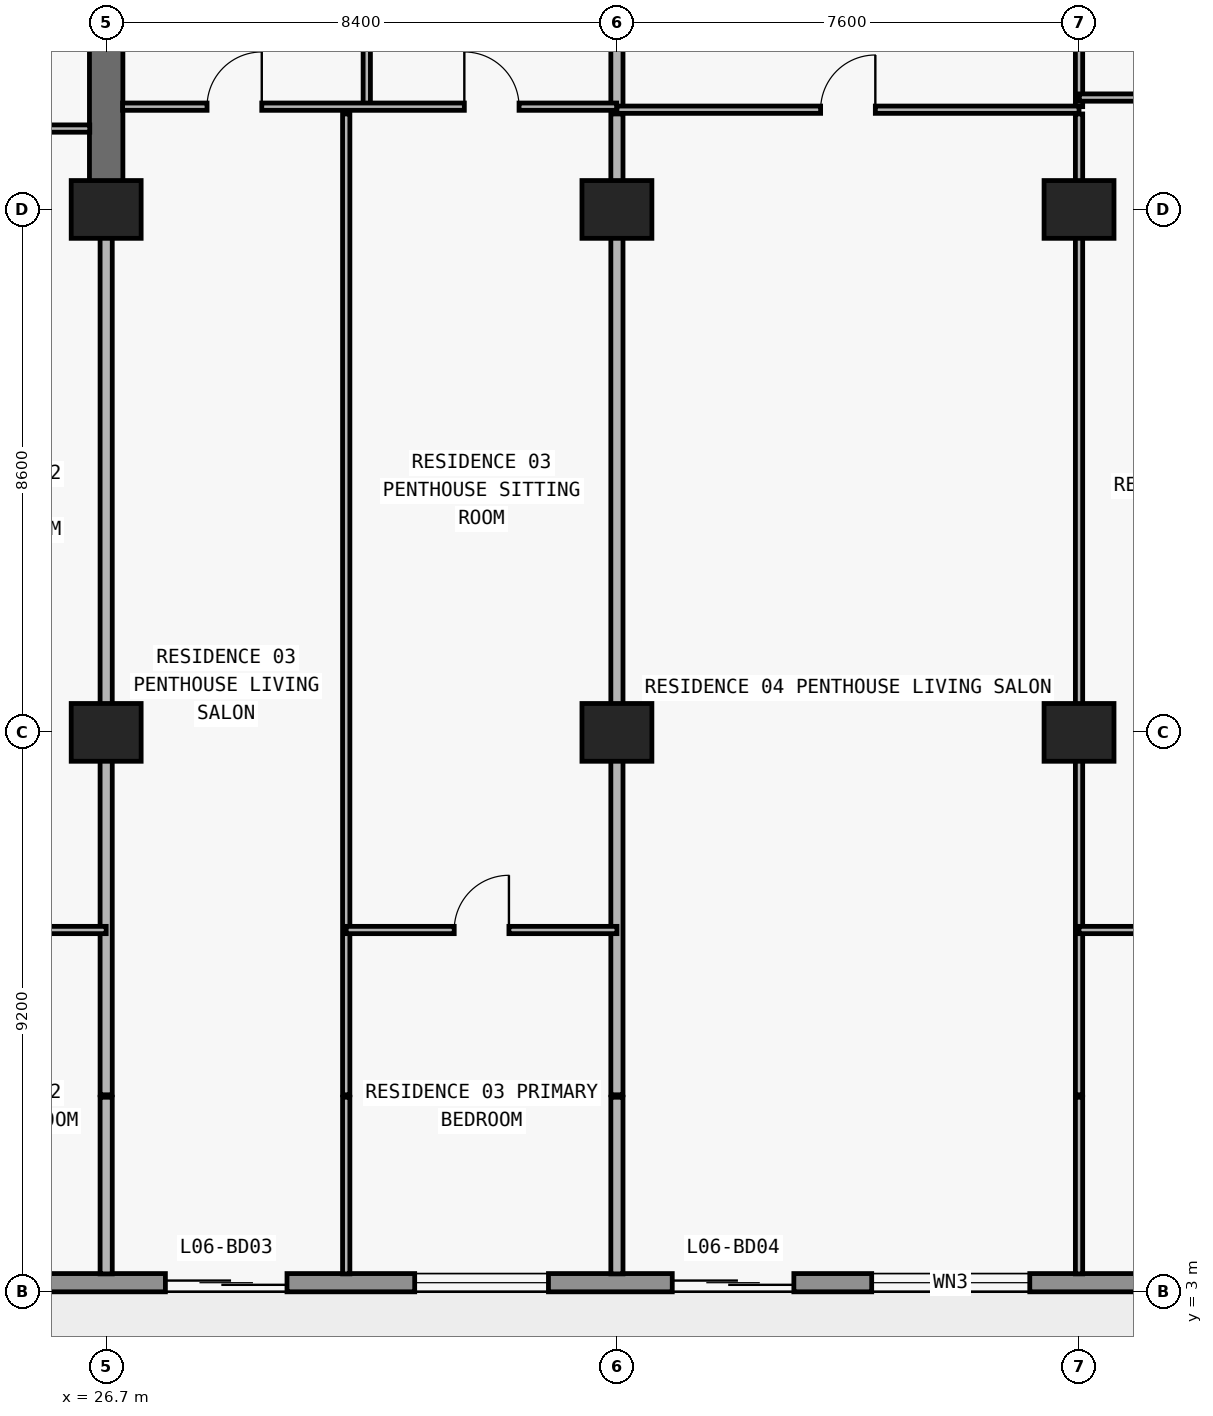
"""IFC4 building model, lengths in metres.
Left out: names, types, materials, properties, quantities, classifications, styles, units other than length and angle.
Written with IfcOpenShell. Run it as: python <this file> out.ifc"""

import sys

from ifc_helpers import new_model, si_unit, direction, frame, frame_2d, origin, origin_2d, place, context, subcontext, project, spatial, rectangle, extrude, element, fill, save


model = new_model("IFC4")
c1 = context("Model", 3, precision=1e-05, world=origin(), true_north=direction((0.0, 1.0)))
c2 = subcontext(c1, "Body", "Model", "MODEL_VIEW")
j1 = project(units=[si_unit("LENGTHUNIT", "METRE"), si_unit("PLANEANGLEUNIT", "RADIAN")], contexts=[c1])
p1 = place(None, origin())
s1 = spatial("IfcSite", under=j1, at=p1, CompositionType="ELEMENT")
p2 = place(p1, origin())
s2 = spatial("IfcBuilding", under=s1, at=p2, CompositionType="ELEMENT")
p3 = place(p2, frame((0.0, 0.0, 30.0)))
s3 = spatial("IfcBuildingStorey", under=s2, at=p3, CompositionType="ELEMENT", Elevation=30.0)
for number, where, z_axis, x_axis in (
    (1, (26.7, 12.2, 0.0), (0.0, 0.0, 1.0), (1.0, 0.0, 0.0)),
    (2, (35.1, 12.2, 0.0), (0.0, 0.0, 1.0), (1.0, 0.0, 0.0)),
    (3, (42.7, 12.2, 0.0), (0.0, 0.0, 1.0), (1.0, 0.0, 0.0)),
    (4, (26.7, 20.8, 0.0), (0.0, 0.0, 1.0), (1.0, 0.0, 0.0)),
    (5, (35.1, 20.8, 0.0), (0.0, 0.0, 1.0), (1.0, 0.0, 0.0)),
    (6, (42.7, 20.8, 0.0), (0.0, 0.0, 1.0), (1.0, 0.0, 0.0)),
):
    element("IfcColumn", number, at=place(p3, frame(where, z_axis=z_axis, x_axis=x_axis)), inside=s3, PredefinedType="COLUMN", context=c2, shape_type="SweptSolid", body=[
        extrude(rectangle(XDim=1.15, YDim=0.95, at=origin_2d()), origin(), (0.0, 0.0, 1.0), 3.05),
    ])
p4 = place(p3, frame((26.7, 20.8, 0.0), z_axis=(0.0, 0.0, 1.0), x_axis=(0.0, 1.0, 0.0)))
e7 = element("IfcWall", 7, at=p4, inside=s3, PredefinedType="SHEAR", context=c2, shape_type="SweptSolid", body=[
    extrude(rectangle(XDim=8.6, YDim=0.55, at=frame_2d((4.3, 0.0))), origin(), (0.0, 0.0, 1.0), 3.05),
])
p5 = place(p3, frame((72.7, 3.15, 0.0), z_axis=(0.0, 0.0, 1.0), x_axis=(-1.0, 0.0, 0.0)))
e8 = element("IfcWall", 8, at=p5, inside=s3, PredefinedType="STANDARD", context=c2, shape_type="SweptSolid", body=[
    extrude(rectangle(XDim=67.6, YDim=0.3, at=frame_2d((33.8, 0.0))), origin(), (0.0, 0.0, 1.0), 3.05),
])
p6 = place(p5, frame((59.826, 0.0, 0.0)))
e9 = element("IfcOpeningElement", 9, at=p6, cuts=e8, PredefinedType="OPENING", context=c2, shape_type="SweptSolid", body=[
    extrude(rectangle(XDim=2.0, YDim=2.3, at=frame_2d((1.0, 1.15))), frame((0.0, 0.16, 0.0), z_axis=(0.0, -1.0, 0.0), x_axis=(1.0, 0.0, 0.0)), (0.0, 0.0, 1.0), 0.32),
])
p7 = place(p5, frame((55.526, 0.0, 0.85)))
e10 = element("IfcOpeningElement", 10, at=p7, cuts=e8, PredefinedType="OPENING", context=c2, shape_type="SweptSolid", body=[
    extrude(rectangle(XDim=2.2, YDim=1.55, at=frame_2d((1.1, 0.775))), frame((0.0, 0.16, 0.0), z_axis=(0.0, -1.0, 0.0), x_axis=(1.0, 0.0, 0.0)), (0.0, 0.0, 1.0), 0.32),
])
p8 = place(p5, frame((51.09, 0.0, 0.0)))
e11 = element("IfcOpeningElement", 11, at=p8, cuts=e8, PredefinedType="OPENING", context=c2, shape_type="SweptSolid", body=[
    extrude(rectangle(XDim=2.0, YDim=2.3, at=frame_2d((1.0, 1.15))), frame((0.0, 0.16, 0.0), z_axis=(0.0, -1.0, 0.0), x_axis=(1.0, 0.0, 0.0)), (0.0, 0.0, 1.0), 0.32),
])
p9 = place(p5, frame((46.99, 0.0, 0.85)))
e12 = element("IfcOpeningElement", 12, at=p9, cuts=e8, PredefinedType="OPENING", context=c2, shape_type="SweptSolid", body=[
    extrude(rectangle(XDim=1.8, YDim=1.55, at=frame_2d((0.9, 0.775))), frame((0.0, 0.16, 0.0), z_axis=(0.0, -1.0, 0.0), x_axis=(1.0, 0.0, 0.0)), (0.0, 0.0, 1.0), 0.32),
])
p10 = place(p5, frame((43.026, 0.0, 0.0)))
e13 = element("IfcOpeningElement", 13, at=p10, cuts=e8, PredefinedType="OPENING", context=c2, shape_type="SweptSolid", body=[
    extrude(rectangle(XDim=2.0, YDim=2.3, at=frame_2d((1.0, 1.15))), frame((0.0, 0.16, 0.0), z_axis=(0.0, -1.0, 0.0), x_axis=(1.0, 0.0, 0.0)), (0.0, 0.0, 1.0), 0.32),
])
p11 = place(p5, frame((38.726, 0.0, 0.85)))
e14 = element("IfcOpeningElement", 14, at=p11, cuts=e8, PredefinedType="OPENING", context=c2, shape_type="SweptSolid", body=[
    extrude(rectangle(XDim=2.2, YDim=1.55, at=frame_2d((1.1, 0.775))), frame((0.0, 0.16, 0.0), z_axis=(0.0, -1.0, 0.0), x_axis=(1.0, 0.0, 0.0)), (0.0, 0.0, 1.0), 0.32),
])
p12 = place(p5, frame((34.69, 0.0, 0.0)))
e15 = element("IfcOpeningElement", 15, at=p12, cuts=e8, PredefinedType="OPENING", context=c2, shape_type="SweptSolid", body=[
    extrude(rectangle(XDim=2.0, YDim=2.3, at=frame_2d((1.0, 1.15))), frame((0.0, 0.16, 0.0), z_axis=(0.0, -1.0, 0.0), x_axis=(1.0, 0.0, 0.0)), (0.0, 0.0, 1.0), 0.32),
])
p13 = place(p5, frame((30.81, 0.0, 0.65)))
e16 = element("IfcOpeningElement", 16, at=p13, cuts=e8, PredefinedType="OPENING", context=c2, shape_type="SweptSolid", body=[
    extrude(rectangle(XDim=2.6, YDim=1.85, at=frame_2d((1.3, 0.925))), frame((0.0, 0.16, 0.0), z_axis=(0.0, -1.0, 0.0), x_axis=(1.0, 0.0, 0.0)), (0.0, 0.0, 1.0), 0.32),
])
p14 = place(p5, frame((24.7, 0.0, 0.85)))
e17 = element("IfcOpeningElement", 17, at=p14, cuts=e8, PredefinedType="OPENING", context=c2, shape_type="SweptSolid", body=[
    extrude(rectangle(XDim=2.2, YDim=1.55, at=frame_2d((1.1, 0.775))), frame((0.0, 0.16, 0.0), z_axis=(0.0, -1.0, 0.0), x_axis=(1.0, 0.0, 0.0)), (0.0, 0.0, 1.0), 0.32),
])
p15 = place(p5, frame((18.626, 0.0, 0.0)))
e18 = element("IfcOpeningElement", 18, at=p15, cuts=e8, PredefinedType="OPENING", context=c2, shape_type="SweptSolid", body=[
    extrude(rectangle(XDim=2.0, YDim=2.3, at=frame_2d((1.0, 1.15))), frame((0.0, 0.16, 0.0), z_axis=(0.0, -1.0, 0.0), x_axis=(1.0, 0.0, 0.0)), (0.0, 0.0, 1.0), 0.32),
])
p16 = place(p5, frame((14.326, 0.0, 0.85)))
e19 = element("IfcOpeningElement", 19, at=p16, cuts=e8, PredefinedType="OPENING", context=c2, shape_type="SweptSolid", body=[
    extrude(rectangle(XDim=2.2, YDim=1.55, at=frame_2d((1.1, 0.775))), frame((0.0, 0.16, 0.0), z_axis=(0.0, -1.0, 0.0), x_axis=(1.0, 0.0, 0.0)), (0.0, 0.0, 1.0), 0.32),
])
p17 = place(p5, frame((9.89, 0.0, 0.0)))
e20 = element("IfcOpeningElement", 20, at=p17, cuts=e8, PredefinedType="OPENING", context=c2, shape_type="SweptSolid", body=[
    extrude(rectangle(XDim=2.0, YDim=2.3, at=frame_2d((1.0, 1.15))), frame((0.0, 0.16, 0.0), z_axis=(0.0, -1.0, 0.0), x_axis=(1.0, 0.0, 0.0)), (0.0, 0.0, 1.0), 0.32),
])
p18 = place(p5, frame((5.79, 0.0, 0.85)))
e21 = element("IfcOpeningElement", 21, at=p18, cuts=e8, PredefinedType="OPENING", context=c2, shape_type="SweptSolid", body=[
    extrude(rectangle(XDim=1.8, YDim=1.55, at=frame_2d((0.9, 0.775))), frame((0.0, 0.16, 0.0), z_axis=(0.0, -1.0, 0.0), x_axis=(1.0, 0.0, 0.0)), (0.0, 0.0, 1.0), 0.32),
])
p19 = place(p3, frame((26.7, 3.295, 0.0), z_axis=(0.0, 0.0, 1.0), x_axis=(0.0, 1.0, 0.0)))
e22 = element("IfcWall", 22, at=p19, inside=s3, PredefinedType="PARTITIONING", context=c2, shape_type="SweptSolid", body=[
    extrude(rectangle(XDim=2.905, YDim=0.2, at=frame_2d((1.453, 0.0))), origin(), (0.0, 0.0, 1.0), 3.05),
])
p20 = place(p3, frame((26.7, 6.24, 0.0), z_axis=(0.0, 0.0, 1.0), x_axis=(0.0, 1.0, 0.0)))
e23 = element("IfcWall", 23, at=p20, inside=s3, PredefinedType="PARTITIONING", context=c2, shape_type="SweptSolid", body=[
    extrude(rectangle(XDim=14.555, YDim=0.2, at=frame_2d((7.277, 0.0))), origin(), (0.0, 0.0, 1.0), 2.11),
])
p21 = place(p3, frame((30.648, 3.295, 0.0), z_axis=(0.0, 0.0, 1.0), x_axis=(0.0, 1.0, 0.0)))
e24 = element("IfcWall", 24, at=p21, inside=s3, PredefinedType="PARTITIONING", context=c2, shape_type="SweptSolid", body=[
    extrude(rectangle(XDim=2.905, YDim=0.12, at=frame_2d((1.453, 0.0))), origin(), (0.0, 0.0, 1.0), 3.05),
])
p22 = place(p3, frame((30.648, 6.24, 0.0), z_axis=(0.0, 0.0, 1.0), x_axis=(0.0, 1.0, 0.0)))
e25 = element("IfcWall", 25, at=p22, inside=s3, PredefinedType="PARTITIONING", context=c2, shape_type="SweptSolid", body=[
    extrude(rectangle(XDim=16.13, YDim=0.12, at=frame_2d((8.065, 0.0))), origin(), (0.0, 0.0, 1.0), 3.05),
])
p23 = place(p3, frame((30.986, 22.49, 0.0), z_axis=(0.0, 0.0, 1.0), x_axis=(0.0, 1.0, 0.0)))
e26 = element("IfcWall", 26, at=p23, inside=s3, PredefinedType="PARTITIONING", context=c2, shape_type="SweptSolid", body=[
    extrude(rectangle(XDim=4.69, YDim=0.12, at=frame_2d((2.345, 0.0))), origin(), (0.0, 0.0, 1.0), 3.05),
])
p24 = place(p23, frame((1.895, 0.0, 0.0)))
e27 = element("IfcOpeningElement", 27, at=p24, cuts=e26, PredefinedType="OPENING", context=c2, shape_type="SweptSolid", body=[
    extrude(rectangle(XDim=0.9, YDim=2.15, at=frame_2d((0.45, 1.075))), frame((0.0, 0.07, 0.0), z_axis=(0.0, -1.0, 0.0), x_axis=(1.0, 0.0, 0.0)), (0.0, 0.0, 1.0), 0.14),
])
p25 = place(p3, frame((35.1, 3.295, 0.0), z_axis=(0.0, 0.0, 1.0), x_axis=(0.0, 1.0, 0.0)))
e28 = element("IfcWall", 28, at=p25, inside=s3, PredefinedType="PARTITIONING", context=c2, shape_type="SweptSolid", body=[
    extrude(rectangle(XDim=2.905, YDim=0.2, at=frame_2d((1.453, 0.0))), origin(), (0.0, 0.0, 1.0), 3.05),
])
p26 = place(p3, frame((35.1, 6.24, 0.0), z_axis=(0.0, 0.0, 1.0), x_axis=(0.0, 1.0, 0.0)))
e29 = element("IfcWall", 29, at=p26, inside=s3, PredefinedType="PARTITIONING", context=c2, shape_type="SweptSolid", body=[
    extrude(rectangle(XDim=16.13, YDim=0.2, at=frame_2d((8.065, 0.0))), origin(), (0.0, 0.0, 1.0), 2.11),
])
p27 = place(p3, frame((35.1, 22.49, 0.0), z_axis=(0.0, 0.0, 1.0), x_axis=(0.0, 1.0, 0.0)))
e30 = element("IfcWall", 30, at=p27, inside=s3, PredefinedType="PARTITIONING", context=c2, shape_type="SweptSolid", body=[
    extrude(rectangle(XDim=4.69, YDim=0.2, at=frame_2d((2.345, 0.0))), origin(), (0.0, 0.0, 1.0), 2.11),
])
p28 = place(p3, frame((42.7, 3.295, 0.0), z_axis=(0.0, 0.0, 1.0), x_axis=(0.0, 1.0, 0.0)))
e31 = element("IfcWall", 31, at=p28, inside=s3, PredefinedType="PARTITIONING", context=c2, shape_type="SweptSolid", body=[
    extrude(rectangle(XDim=2.905, YDim=0.12, at=frame_2d((1.453, 0.0))), origin(), (0.0, 0.0, 1.0), 3.05),
])
p29 = place(p3, frame((42.7, 6.24, 0.0), z_axis=(0.0, 0.0, 1.0), x_axis=(0.0, 1.0, 0.0)))
e32 = element("IfcWall", 32, at=p29, inside=s3, PredefinedType="PARTITIONING", context=c2, shape_type="SweptSolid", body=[
    extrude(rectangle(XDim=16.13, YDim=0.12, at=frame_2d((8.065, 0.0))), origin(), (0.0, 0.0, 1.0), 2.11),
])
p30 = place(p3, frame((42.7, 22.49, 0.0), z_axis=(0.0, 0.0, 1.0), x_axis=(0.0, 1.0, 0.0)))
e33 = element("IfcWall", 33, at=p30, inside=s3, PredefinedType="PARTITIONING", context=c2, shape_type="SweptSolid", body=[
    extrude(rectangle(XDim=4.69, YDim=0.12, at=frame_2d((2.345, 0.0))), origin(), (0.0, 0.0, 1.0), 2.11),
])
p31 = place(p30, frame((1.9, 0.0, 0.0)))
e34 = element("IfcOpeningElement", 34, at=p31, cuts=e33, PredefinedType="OPENING", context=c2, shape_type="SweptSolid", body=[
    extrude(rectangle(XDim=0.9, YDim=2.06, at=frame_2d((0.45, 1.03))), frame((0.0, 0.07, 0.0), z_axis=(0.0, -1.0, 0.0), x_axis=(1.0, 0.0, 0.0)), (0.0, 0.0, 1.0), 0.14),
])
p32 = place(p3, frame((22.92, 8.95, 0.0), z_axis=(0.0, 0.0, 1.0), x_axis=(1.0, 0.0, 0.0)))
e35 = element("IfcWall", 35, at=p32, inside=s3, PredefinedType="PARTITIONING", context=c2, shape_type="SweptSolid", body=[
    extrude(rectangle(XDim=3.78, YDim=0.12, at=frame_2d((1.89, 0.0))), origin(), (0.0, 0.0, 1.0), 3.05),
])
p33 = place(p32, frame((1.44, 0.0, 0.0)))
e36 = element("IfcOpeningElement", 36, at=p33, cuts=e35, PredefinedType="OPENING", context=c2, shape_type="SweptSolid", body=[
    extrude(rectangle(XDim=0.9, YDim=2.15, at=frame_2d((0.45, 1.075))), frame((0.0, 0.07, 0.0), z_axis=(0.0, -1.0, 0.0), x_axis=(1.0, 0.0, 0.0)), (0.0, 0.0, 1.0), 0.14),
])
p34 = place(p3, frame((30.648, 8.95, 0.0), z_axis=(0.0, 0.0, 1.0), x_axis=(1.0, 0.0, 0.0)))
e37 = element("IfcWall", 37, at=p34, inside=s3, PredefinedType="PARTITIONING", context=c2, shape_type="SweptSolid", body=[
    extrude(rectangle(XDim=4.452, YDim=0.12, at=frame_2d((2.226, 0.0))), origin(), (0.0, 0.0, 1.0), 3.05),
])
p35 = place(p34, frame((1.776, 0.0, 0.0)))
e38 = element("IfcOpeningElement", 38, at=p35, cuts=e37, PredefinedType="OPENING", context=c2, shape_type="SweptSolid", body=[
    extrude(rectangle(XDim=0.9, YDim=2.15, at=frame_2d((0.45, 1.075))), frame((0.0, 0.07, 0.0), z_axis=(0.0, -1.0, 0.0), x_axis=(1.0, 0.0, 0.0)), (0.0, 0.0, 1.0), 0.14),
])
p36 = place(p3, frame((42.7, 8.95, 0.0), z_axis=(0.0, 0.0, 1.0), x_axis=(1.0, 0.0, 0.0)))
e39 = element("IfcWall", 39, at=p36, inside=s3, PredefinedType="PARTITIONING", context=c2, shape_type="SweptSolid", body=[
    extrude(rectangle(XDim=8.4, YDim=0.12, at=frame_2d((4.2, 0.0))), origin(), (0.0, 0.0, 1.0), 3.05),
])
p37 = place(p36, frame((3.75, 0.0, 0.0)))
e40 = element("IfcOpeningElement", 40, at=p37, cuts=e39, PredefinedType="OPENING", context=c2, shape_type="SweptSolid", body=[
    extrude(rectangle(XDim=0.9, YDim=2.15, at=frame_2d((0.45, 1.075))), frame((0.0, 0.07, 0.0), z_axis=(0.0, -1.0, 0.0), x_axis=(1.0, 0.0, 0.0)), (0.0, 0.0, 1.0), 0.14),
])
p38 = place(p3, frame((18.3, 22.13, 0.0), z_axis=(0.0, 0.0, 1.0), x_axis=(1.0, 0.0, 0.0)))
e41 = element("IfcWall", 41, at=p38, inside=s3, PredefinedType="PARTITIONING", context=c2, shape_type="SweptSolid", body=[
    extrude(rectangle(XDim=8.13, YDim=0.12, at=frame_2d((4.065, 0.0))), origin(), (0.0, 0.0, 1.0), 3.05),
])
p39 = place(p38, frame((1.86, 0.0, 0.0)))
e42 = element("IfcOpeningElement", 42, at=p39, cuts=e41, PredefinedType="OPENING", context=c2, shape_type="SweptSolid", body=[
    extrude(rectangle(XDim=0.9, YDim=2.15, at=frame_2d((0.45, 1.075))), frame((0.0, 0.07, 0.0), z_axis=(0.0, -1.0, 0.0), x_axis=(1.0, 0.0, 0.0)), (0.0, 0.0, 1.0), 0.14),
])
p40 = place(p38, frame((6.008, 0.0, 0.0)))
e43 = element("IfcOpeningElement", 43, at=p40, cuts=e41, PredefinedType="OPENING", context=c2, shape_type="SweptSolid", body=[
    extrude(rectangle(XDim=0.9, YDim=2.15, at=frame_2d((0.45, 1.075))), frame((0.0, 0.07, 0.0), z_axis=(0.0, -1.0, 0.0), x_axis=(1.0, 0.0, 0.0)), (0.0, 0.0, 1.0), 0.14),
])
p41 = place(p3, frame((35.1, 22.44, 0.0), z_axis=(0.0, 0.0, 1.0), x_axis=(1.0, 0.0, 0.0)))
e44 = element("IfcWall", 44, at=p41, inside=s3, PredefinedType="PARTITIONING", context=c2, shape_type="SweptSolid", body=[
    extrude(rectangle(XDim=7.6, YDim=0.12, at=frame_2d((3.8, 0.0))), origin(), (0.0, 0.0, 1.0), 3.05),
])
p42 = place(p41, frame((3.35, 0.0, 0.0)))
e45 = element("IfcOpeningElement", 45, at=p42, cuts=e44, PredefinedType="OPENING", context=c2, shape_type="SweptSolid", body=[
    extrude(rectangle(XDim=0.9, YDim=2.15, at=frame_2d((0.45, 1.075))), frame((0.0, 0.07, 0.0), z_axis=(0.0, -1.0, 0.0), x_axis=(1.0, 0.0, 0.0)), (0.0, 0.0, 1.0), 0.14),
])
p43 = place(p3, frame((26.97, 22.49, 0.0), z_axis=(0.0, 0.0, 1.0), x_axis=(1.0, 0.0, 0.0)))
e46 = element("IfcWall", 46, at=p43, inside=s3, PredefinedType="PARTITIONING", context=c2, shape_type="SweptSolid", body=[
    extrude(rectangle(XDim=8.125, YDim=0.12, at=frame_2d((4.062, 0.0))), origin(), (0.0, 0.0, 1.0), 3.05),
])
p44 = place(p43, frame((1.389, 0.0, 0.0)))
e47 = element("IfcOpeningElement", 47, at=p44, cuts=e46, PredefinedType="OPENING", context=c2, shape_type="SweptSolid", body=[
    extrude(rectangle(XDim=0.9, YDim=2.15, at=frame_2d((0.45, 1.075))), frame((0.0, 0.07, 0.0), z_axis=(0.0, -1.0, 0.0), x_axis=(1.0, 0.0, 0.0)), (0.0, 0.0, 1.0), 0.14),
])
p45 = place(p43, frame((5.621, 0.0, 0.0)))
e48 = element("IfcOpeningElement", 48, at=p45, cuts=e46, PredefinedType="OPENING", context=c2, shape_type="SweptSolid", body=[
    extrude(rectangle(XDim=0.9, YDim=2.15, at=frame_2d((0.45, 1.075))), frame((0.0, 0.07, 0.0), z_axis=(0.0, -1.0, 0.0), x_axis=(1.0, 0.0, 0.0)), (0.0, 0.0, 1.0), 0.14),
])
p46 = place(p3, frame((42.705, 22.64, 0.0), z_axis=(0.0, 0.0, 1.0), x_axis=(1.0, 0.0, 0.0)))
e49 = element("IfcWall", 49, at=p46, inside=s3, PredefinedType="PARTITIONING", context=c2, shape_type="SweptSolid", body=[
    extrude(rectangle(XDim=8.125, YDim=0.12, at=frame_2d((4.062, 0.0))), origin(), (0.0, 0.0, 1.0), 3.05),
])
p47 = place(p46, frame((3.613, 0.0, 0.0)))
e50 = element("IfcOpeningElement", 50, at=p47, cuts=e49, PredefinedType="OPENING", context=c2, shape_type="SweptSolid", body=[
    extrude(rectangle(XDim=0.9, YDim=2.15, at=frame_2d((0.45, 1.075))), frame((0.0, 0.07, 0.0), z_axis=(0.0, -1.0, 0.0), x_axis=(1.0, 0.0, 0.0)), (0.0, 0.0, 1.0), 0.14),
])
p48 = place(p10, origin())
e51 = element("IfcDoor", 51, at=p48, inside=s3, OperationType="DOUBLE_DOOR_SLIDING", PredefinedType="DOOR", context=c2, shape_type="SweptSolid", body=[
    extrude(rectangle(XDim=2.0, YDim=2.3, at=frame_2d((1.0, 1.15))), frame((0.0, 0.025, 0.0), z_axis=(0.0, -1.0, 0.0), x_axis=(1.0, 0.0, 0.0)), (0.0, 0.0, 1.0), 0.05),
])
fill(e13, e51)
p49 = place(p11, origin())
e52 = element("IfcWindow", 52, at=p49, inside=s3, PartitioningType="SINGLE_PANEL", PredefinedType="WINDOW", context=c2, shape_type="SweptSolid", body=[
    extrude(rectangle(XDim=2.2, YDim=1.55, at=frame_2d((1.1, 0.775))), frame((0.0, 0.03, 0.0), z_axis=(0.0, -1.0, 0.0), x_axis=(1.0, 0.0, 0.0)), (0.0, 0.0, 1.0), 0.06),
])
fill(e14, e52)
p50 = place(p12, origin())
e53 = element("IfcDoor", 53, at=p50, inside=s3, OperationType="DOUBLE_DOOR_SLIDING", PredefinedType="DOOR", context=c2, shape_type="SweptSolid", body=[
    extrude(rectangle(XDim=2.0, YDim=2.3, at=frame_2d((1.0, 1.15))), frame((0.0, 0.025, 0.0), z_axis=(0.0, -1.0, 0.0), x_axis=(1.0, 0.0, 0.0)), (0.0, 0.0, 1.0), 0.05),
])
fill(e15, e53)
p51 = place(p13, origin())
e54 = element("IfcWindow", 54, at=p51, inside=s3, PartitioningType="SINGLE_PANEL", PredefinedType="WINDOW", context=c2, shape_type="SweptSolid", body=[
    extrude(rectangle(XDim=2.6, YDim=1.85, at=frame_2d((1.3, 0.925))), frame((0.0, 0.03, 0.0), z_axis=(0.0, -1.0, 0.0), x_axis=(1.0, 0.0, 0.0)), (0.0, 0.0, 1.0), 0.06),
])
fill(e16, e54)
p52 = place(p44, origin())
e55 = element("IfcDoor", 55, at=p52, inside=s3, OperationType="SINGLE_SWING_RIGHT", PredefinedType="DOOR", context=c2, shape_type="SweptSolid", body=[
    extrude(rectangle(XDim=0.9, YDim=2.15, at=frame_2d((0.45, 1.075))), frame((0.0, 0.025, 0.0), z_axis=(0.0, -1.0, 0.0), x_axis=(1.0, 0.0, 0.0)), (0.0, 0.0, 1.0), 0.05),
])
fill(e47, e55)
p53 = place(p45, origin())
e56 = element("IfcDoor", 56, at=p53, inside=s3, OperationType="SINGLE_SWING_LEFT", PredefinedType="DOOR", context=c2, shape_type="SweptSolid", body=[
    extrude(rectangle(XDim=0.9, YDim=2.15, at=frame_2d((0.45, 1.075))), frame((0.0, 0.025, 0.0), z_axis=(0.0, -1.0, 0.0), x_axis=(1.0, 0.0, 0.0)), (0.0, 0.0, 1.0), 0.05),
])
fill(e48, e56)
p54 = place(p35, origin())
e57 = element("IfcDoor", 57, at=p54, inside=s3, OperationType="SINGLE_SWING_RIGHT", PredefinedType="DOOR", context=c2, shape_type="SweptSolid", body=[
    extrude(rectangle(XDim=0.9, YDim=2.15, at=frame_2d((0.45, 1.075))), frame((0.0, 0.025, 0.0), z_axis=(0.0, -1.0, 0.0), x_axis=(1.0, 0.0, 0.0)), (0.0, 0.0, 1.0), 0.05),
])
fill(e38, e57)
p55 = place(p42, origin())
e58 = element("IfcDoor", 58, at=p55, inside=s3, OperationType="SINGLE_SWING_RIGHT", PredefinedType="DOOR", context=c2, shape_type="SweptSolid", body=[
    extrude(rectangle(XDim=0.9, YDim=2.15, at=frame_2d((0.45, 1.075))), frame((0.0, 0.025, 0.0), z_axis=(0.0, -1.0, 0.0), x_axis=(1.0, 0.0, 0.0)), (0.0, 0.0, 1.0), 0.05),
])
fill(e45, e58)
save(model, sys.argv[1])
